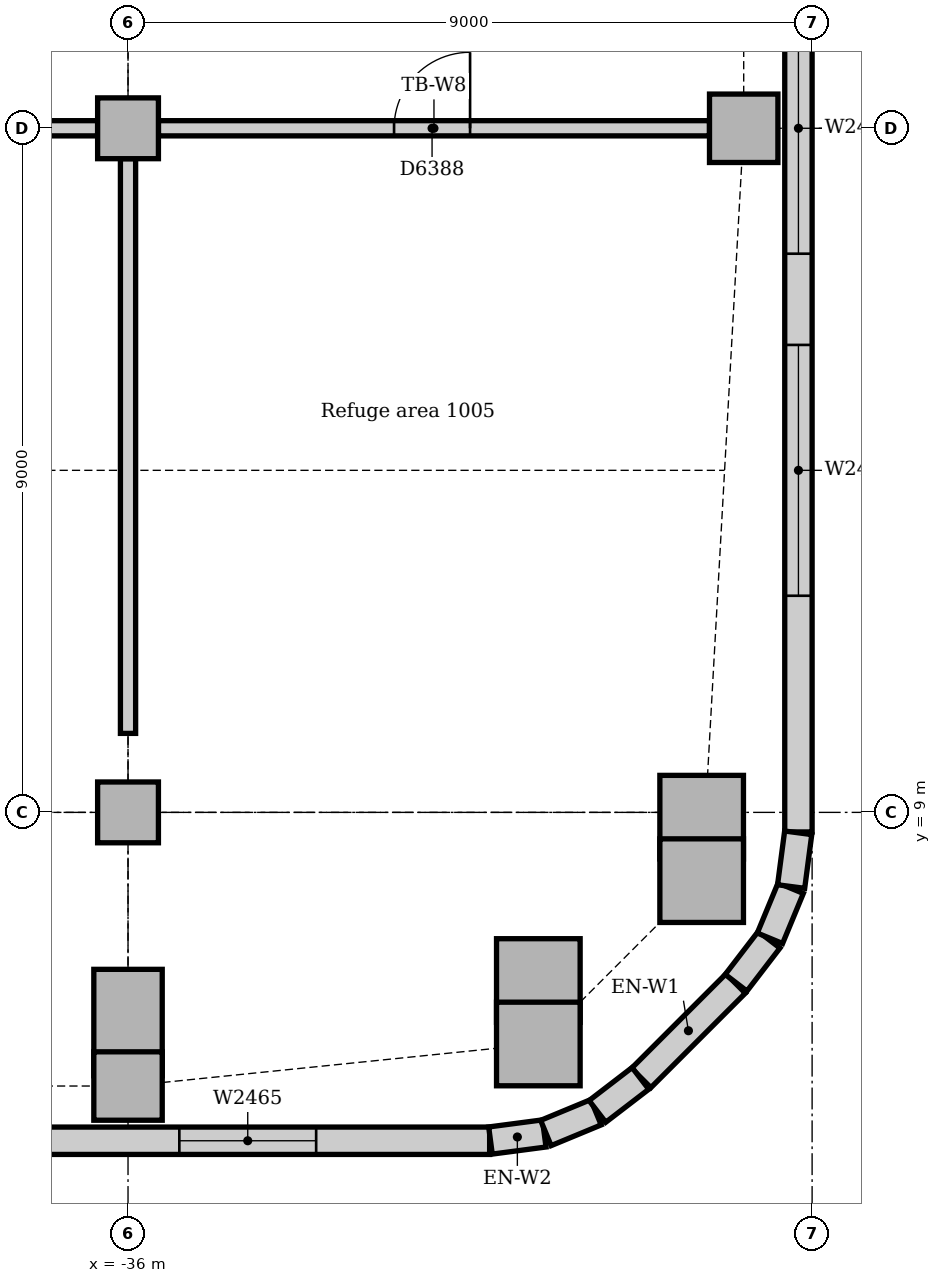
"""IFC4 building model, lengths in metres.
Left out: names, types, materials, properties, quantities, classifications, styles, units other than length and angle.
Written with IfcOpenShell. Run it as: python <this file> out.ifc"""

import sys

from ifc_helpers import new_model, si_unit, direction, frame, frame_2d, origin, origin_2d, place, context, subcontext, project, spatial, rectangle, extrude, element, fill, save


model = new_model("IFC4")
c1 = context("Model", 3, precision=1e-05, world=origin(), true_north=direction((0.0, 1.0)))
c2 = subcontext(c1, "Body", "Model", "MODEL_VIEW")
j1 = project(units=[si_unit("LENGTHUNIT", "METRE"), si_unit("PLANEANGLEUNIT", "RADIAN")], contexts=[c1])
p1 = place(None, origin())
s1 = spatial("IfcSite", under=j1, at=p1, CompositionType="ELEMENT")
p2 = place(p1, origin())
s2 = spatial("IfcBuilding", under=s1, at=p2, CompositionType="ELEMENT")
p3 = place(p2, frame((0.0, 0.0, 46.0)))
s3 = spatial("IfcBuildingStorey", under=s2, at=p3, CompositionType="ELEMENT", Elevation=46.0)
for number, where, z_axis, x_axis in (
    (1, (-30.602, 5.953, 0.0), (0.0, 0.0, 1.0), (1.0, 0.0, 0.0)),
    (2, (-28.453, 8.102, 0.0), (0.0, 0.0, 1.0), (1.0, 0.0, 0.0)),
):
    element("IfcColumn", number, at=place(p3, frame(where, z_axis=z_axis, x_axis=x_axis)), inside=s3, PredefinedType="COLUMN", context=c2, shape_type="SweptSolid", body=[
        extrude(rectangle(XDim=1.1, YDim=1.1, at=origin_2d()), origin(), (0.0, 0.0, 1.0), 4.85),
    ])
for number, where, z_axis, x_axis in (
    (3, (-36.0, 5.4, 0.0), (0.0, 0.0, 1.0), (1.0, 0.0, 0.0)),
    (4, (-27.9, 18.0, 0.0), (0.0, 0.0, 1.0), (1.0, 0.0, 0.0)),
):
    element("IfcColumn", number, at=place(p3, frame(where, z_axis=z_axis, x_axis=x_axis)), inside=s3, PredefinedType="COLUMN", context=c2, shape_type="SweptSolid", body=[
        extrude(rectangle(XDim=0.9, YDim=0.9, at=origin_2d()), origin(), (0.0, 0.0, 1.0), 4.85),
    ])
for number, where, z_axis, x_axis in (
    (5, (-36.0, 9.0, 0.0), (0.0, 0.0, 1.0), (1.0, 0.0, 0.0)),
    (6, (-36.0, 18.0, 0.0), (0.0, 0.0, 1.0), (1.0, 0.0, 0.0)),
):
    element("IfcColumn", number, at=place(p3, frame(where, z_axis=z_axis, x_axis=x_axis)), inside=s3, PredefinedType="COLUMN", context=c2, shape_type="SweptSolid", body=[
        extrude(rectangle(XDim=0.8, YDim=0.8, at=origin_2d()), origin(), (0.0, 0.0, 1.0), 4.85),
    ])
p4 = place(p3, frame((-61.757, 4.68, 0.0), z_axis=(0.0, 0.0, 1.0), x_axis=(1.0, 0.0, 0.0)))
e7 = element("IfcWall", 7, at=p4, inside=s3, PredefinedType="STANDARD", context=c2, shape_type="SweptSolid", body=[
    extrude(rectangle(XDim=30.515, YDim=0.36, at=frame_2d((15.257, 0.0))), origin(), (0.0, 0.0, 1.0), 4.85),
])
p5 = place(p4, frame((3.632, 0.0, 0.9)))
e8 = element("IfcOpeningElement", 8, at=p5, cuts=e7, PredefinedType="OPENING", context=c2, shape_type="SweptSolid", body=[
    extrude(rectangle(XDim=1.8, YDim=2.2, at=frame_2d((0.9, 1.1))), frame((0.0, 0.19, 0.0), z_axis=(0.0, -1.0, 0.0), x_axis=(1.0, 0.0, 0.0)), (0.0, 0.0, 1.0), 0.38),
])
p6 = place(p4, frame((6.857, 0.0, 0.9)))
e9 = element("IfcOpeningElement", 9, at=p6, cuts=e7, PredefinedType="OPENING", context=c2, shape_type="SweptSolid", body=[
    extrude(rectangle(XDim=3.3, YDim=2.2, at=frame_2d((1.65, 1.1))), frame((0.0, 0.19, 0.0), z_axis=(0.0, -1.0, 0.0), x_axis=(1.0, 0.0, 0.0)), (0.0, 0.0, 1.0), 0.38),
])
p7 = place(p4, frame((11.357, 0.0, 0.9)))
e10 = element("IfcOpeningElement", 10, at=p7, cuts=e7, PredefinedType="OPENING", context=c2, shape_type="SweptSolid", body=[
    extrude(rectangle(XDim=3.3, YDim=2.2, at=frame_2d((1.65, 1.1))), frame((0.0, 0.19, 0.0), z_axis=(0.0, -1.0, 0.0), x_axis=(1.0, 0.0, 0.0)), (0.0, 0.0, 1.0), 0.38),
])
p8 = place(p4, frame((17.432, 0.0, 1.2)))
e11 = element("IfcOpeningElement", 11, at=p8, cuts=e7, PredefinedType="OPENING", context=c2, shape_type="SweptSolid", body=[
    extrude(rectangle(XDim=1.8, YDim=1.2, at=frame_2d((0.9, 0.6))), frame((0.0, 0.19, 0.0), z_axis=(0.0, -1.0, 0.0), x_axis=(1.0, 0.0, 0.0)), (0.0, 0.0, 1.0), 0.38),
])
p9 = place(p4, frame((20.357, 0.0, 0.9)))
e12 = element("IfcOpeningElement", 12, at=p9, cuts=e7, PredefinedType="OPENING", context=c2, shape_type="SweptSolid", body=[
    extrude(rectangle(XDim=3.3, YDim=2.2, at=frame_2d((1.65, 1.1))), frame((0.0, 0.19, 0.0), z_axis=(0.0, -1.0, 0.0), x_axis=(1.0, 0.0, 0.0)), (0.0, 0.0, 1.0), 0.38),
])
p10 = place(p4, frame((26.432, 0.0, 1.2)))
e13 = element("IfcOpeningElement", 13, at=p10, cuts=e7, PredefinedType="OPENING", context=c2, shape_type="SweptSolid", body=[
    extrude(rectangle(XDim=1.8, YDim=1.2, at=frame_2d((0.9, 0.6))), frame((0.0, 0.19, 0.0), z_axis=(0.0, -1.0, 0.0), x_axis=(1.0, 0.0, 0.0)), (0.0, 0.0, 1.0), 0.38),
])
p11 = place(p3, frame((-29.249, 5.506, 0.0), z_axis=(0.0, 0.0, 1.0), x_axis=(0.707106781187, 0.707106781187, 0.0)))
e14 = element("IfcWall", 14, at=p11, inside=s3, PredefinedType="STANDARD", context=c2, shape_type="SweptSolid", body=[
    extrude(rectangle(XDim=1.757, YDim=0.36, at=frame_2d((0.879, 0.0))), origin(), (0.0, 0.0, 1.0), 4.85),
])
p12 = place(p3, frame((-27.18, 8.743, 0.0), z_axis=(0.0, 0.0, 1.0), x_axis=(0.0, 1.0, 0.0)))
e15 = element("IfcWall", 15, at=p12, inside=s3, PredefinedType="STANDARD", context=c2, shape_type="SweptSolid", body=[
    extrude(rectangle(XDim=12.257, YDim=0.36, at=frame_2d((6.129, 0.0))), origin(), (0.0, 0.0, 1.0), 4.85),
])
p13 = place(p12, frame((3.107, 0.0, 0.9)))
e16 = element("IfcOpeningElement", 16, at=p13, cuts=e15, PredefinedType="OPENING", context=c2, shape_type="SweptSolid", body=[
    extrude(rectangle(XDim=3.3, YDim=2.2, at=frame_2d((1.65, 1.1))), frame((0.0, 0.19, 0.0), z_axis=(0.0, -1.0, 0.0), x_axis=(1.0, 0.0, 0.0)), (0.0, 0.0, 1.0), 0.38),
])
p14 = place(p12, frame((7.607, 0.0, 0.9)))
e17 = element("IfcOpeningElement", 17, at=p14, cuts=e15, PredefinedType="OPENING", context=c2, shape_type="SweptSolid", body=[
    extrude(rectangle(XDim=3.3, YDim=2.2, at=frame_2d((1.65, 1.1))), frame((0.0, 0.19, 0.0), z_axis=(0.0, -1.0, 0.0), x_axis=(1.0, 0.0, 0.0)), (0.0, 0.0, 1.0), 0.38),
])
for number, where, z_axis, x_axis in (
    (18, (-31.231, 4.683, 0.0), (0.0, 0.0, 1.0), (0.991, 0.131, 0.0)),
    (19, (-30.503, 4.782, 0.0), (0.0, 0.0, 1.0), (0.924, 0.383, 0.0)),
):
    element("IfcWall", number, at=place(p3, frame(where, z_axis=z_axis, x_axis=x_axis)), inside=s3, PredefinedType="STANDARD", context=c2, shape_type="SweptSolid", body=[
        extrude(rectangle(XDim=0.713, YDim=0.36, at=frame_2d((0.356, 0.0))), origin(), (0.0, 0.0, 1.0), 4.85),
    ])
for number, where, z_axis, x_axis in (
    (20, (-29.825, 5.066, 0.0), (0.0, 0.0, 1.0), (0.793, 0.609, 0.0)),
    (21, (-28.0, 6.759, 0.0), (0.0, 0.0, 1.0), (0.609, 0.793, 0.0)),
):
    element("IfcWall", number, at=place(p3, frame(where, z_axis=z_axis, x_axis=x_axis)), inside=s3, PredefinedType="STANDARD", context=c2, shape_type="SweptSolid", body=[
        extrude(rectangle(XDim=0.713, YDim=0.36, at=frame_2d((0.357, 0.0))), origin(), (0.0, 0.0, 1.0), 4.85),
    ])
for number, where, z_axis, x_axis in (
    (22, (-27.555, 7.344, 0.0), (0.0, 0.0, 1.0), (0.383, 0.924, 0.0)),
    (23, (-27.276, 8.024, 0.0), (0.0, 0.0, 1.0), (0.131, 0.991, 0.0)),
):
    element("IfcWall", number, at=place(p3, frame(where, z_axis=z_axis, x_axis=x_axis)), inside=s3, PredefinedType="STANDARD", context=c2, shape_type="SweptSolid", body=[
        extrude(rectangle(XDim=0.713, YDim=0.36, at=frame_2d((0.356, 0.0))), origin(), (0.0, 0.0, 1.0), 4.85),
    ])
p15 = place(p3, frame((-35.6, 18.0, 0.0), z_axis=(0.0, 0.0, 1.0), x_axis=(1.0, 0.0, 0.0)))
e24 = element("IfcWall", 24, at=p15, inside=s3, PredefinedType="PARTITIONING", context=c2, shape_type="SweptSolid", body=[
    extrude(rectangle(XDim=7.25, YDim=0.2, at=frame_2d((3.625, 0.0))), origin(), (0.0, 0.0, 1.0), 4.158),
])
p16 = place(p15, frame((3.1, 0.0, 0.0)))
e25 = element("IfcOpeningElement", 25, at=p16, cuts=e24, PredefinedType="OPENING", context=c2, shape_type="SweptSolid", body=[
    extrude(rectangle(XDim=1.0, YDim=2.1, at=frame_2d((0.5, 1.05))), frame((0.0, 0.11, 0.0), z_axis=(0.0, -1.0, 0.0), x_axis=(1.0, 0.0, 0.0)), (0.0, 0.0, 1.0), 0.22),
])
p17 = place(p3, frame((-44.6, 18.0, 0.0), z_axis=(0.0, 0.0, 1.0), x_axis=(1.0, 0.0, 0.0)))
e26 = element("IfcWall", 26, at=p17, inside=s3, PredefinedType="PARTITIONING", context=c2, shape_type="SweptSolid", body=[
    extrude(rectangle(XDim=8.2, YDim=0.2, at=frame_2d((4.1, 0.0))), origin(), (0.0, 0.0, 1.0), 4.158),
])
p18 = place(p3, frame((-36.0, 10.039, 0.0), z_axis=(0.0, 0.0, 1.0), x_axis=(0.0, 1.0, 0.0)))
e27 = element("IfcWall", 27, at=p18, inside=s3, PredefinedType="PARTITIONING", context=c2, shape_type="SweptSolid", body=[
    extrude(rectangle(XDim=7.561, YDim=0.2, at=frame_2d((3.78, 0.0))), origin(), (0.0, 0.0, 1.0), 4.256),
])
p19 = place(p10, origin())
e28 = element("IfcWindow", 28, at=p19, inside=s3, PartitioningType="SINGLE_PANEL", PredefinedType="WINDOW", context=c2, shape_type="SweptSolid", body=[
    extrude(rectangle(XDim=1.8, YDim=1.2, at=frame_2d((0.9, 0.6))), frame((0.0, 0.13, 0.0), z_axis=(0.0, -1.0, 0.0), x_axis=(1.0, 0.0, 0.0)), (0.0, 0.0, 1.0), 0.06),
])
fill(e13, e28)
p20 = place(p13, origin())
e29 = element("IfcWindow", 29, at=p20, inside=s3, PartitioningType="SINGLE_PANEL", PredefinedType="WINDOW", context=c2, shape_type="SweptSolid", body=[
    extrude(rectangle(XDim=3.3, YDim=2.2, at=frame_2d((1.65, 1.1))), frame((0.0, 0.13, 0.0), z_axis=(0.0, -1.0, 0.0), x_axis=(1.0, 0.0, 0.0)), (0.0, 0.0, 1.0), 0.06),
])
fill(e16, e29)
p21 = place(p14, origin())
e30 = element("IfcWindow", 30, at=p21, inside=s3, PartitioningType="SINGLE_PANEL", PredefinedType="WINDOW", context=c2, shape_type="SweptSolid", body=[
    extrude(rectangle(XDim=3.3, YDim=2.2, at=frame_2d((1.65, 1.1))), frame((0.0, 0.13, 0.0), z_axis=(0.0, -1.0, 0.0), x_axis=(1.0, 0.0, 0.0)), (0.0, 0.0, 1.0), 0.06),
])
fill(e17, e30)
p22 = place(p16, origin())
e31 = element("IfcDoor", 31, at=p22, inside=s3, OperationType="SINGLE_SWING_RIGHT", PredefinedType="DOOR", context=c2, shape_type="SweptSolid", body=[
    extrude(rectangle(XDim=1.0, YDim=2.1, at=frame_2d((0.5, 1.05))), frame((0.0, 0.025, 0.0), z_axis=(0.0, -1.0, 0.0), x_axis=(1.0, 0.0, 0.0)), (0.0, 0.0, 1.0), 0.05),
])
fill(e25, e31)
save(model, sys.argv[1])
